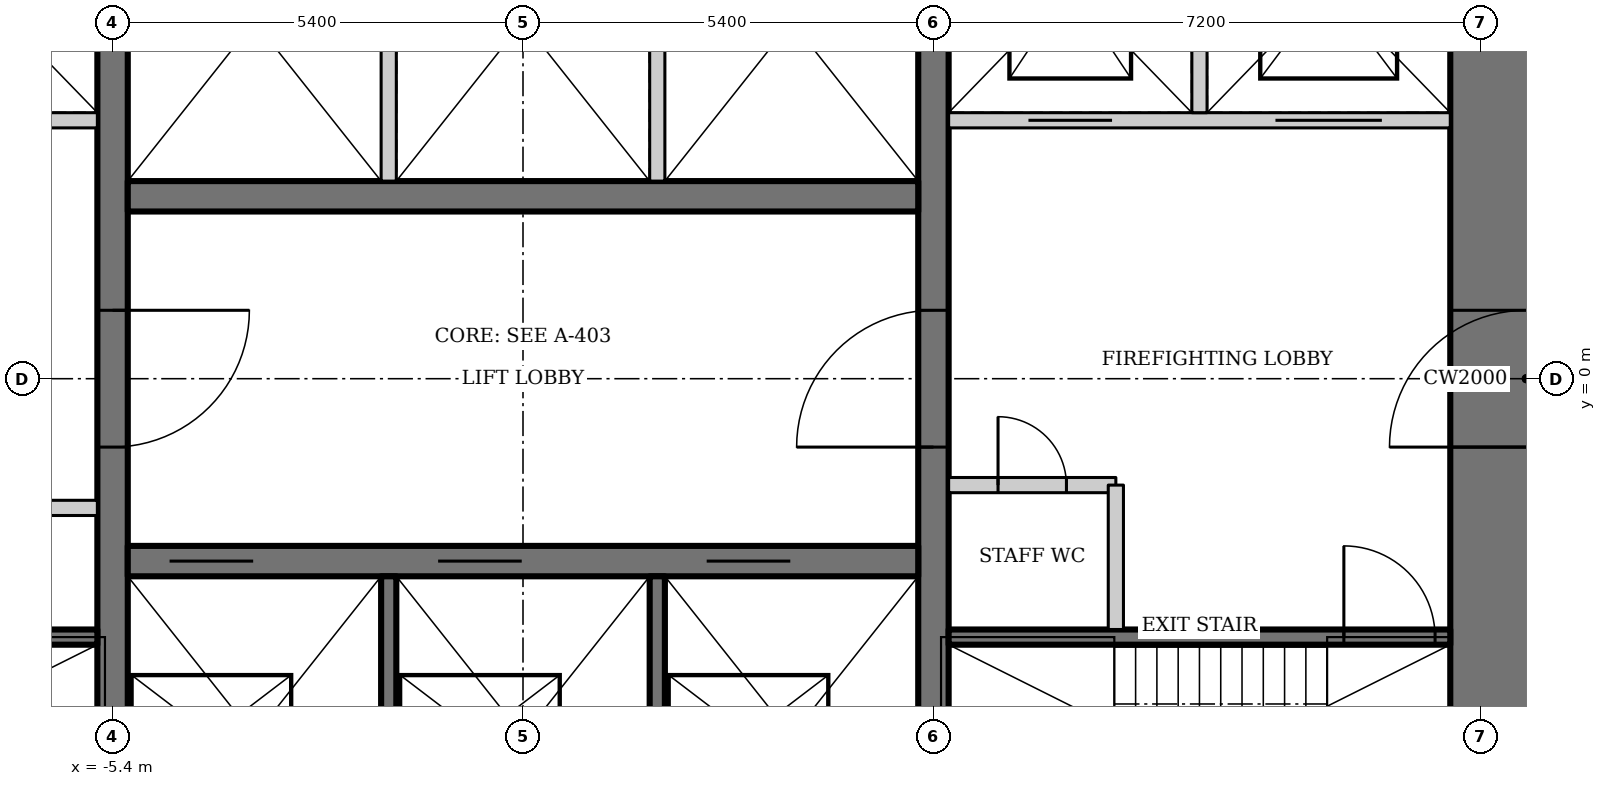
"""IFC4 building model, lengths in metres.
Left out: names, types, materials, properties, quantities, classifications, styles, units other than length and angle.
Written with IfcOpenShell. Run it as: python <this file> out.ifc"""

import sys

from ifc_helpers import new_model, si_unit, direction, frame, frame_2d, origin, place, context, subcontext, project, spatial, rectangle, extrude, element, fill, save


model = new_model("IFC4")
c1 = context("Model", 3, precision=1e-05, world=origin(), true_north=direction((0.0, 1.0)))
c2 = subcontext(c1, "Body", "Model", "MODEL_VIEW")
j1 = project(units=[si_unit("LENGTHUNIT", "METRE"), si_unit("PLANEANGLEUNIT", "RADIAN")], contexts=[c1])
p1 = place(None, origin())
s1 = spatial("IfcSite", under=j1, at=p1, CompositionType="ELEMENT")
p2 = place(p1, origin())
s2 = spatial("IfcBuilding", under=s1, at=p2, CompositionType="ELEMENT")
p3 = place(p2, frame((0.0, 0.0, 98.2)))
s3 = spatial("IfcBuildingStorey", under=s2, at=p3, CompositionType="ELEMENT", Elevation=98.2)
p4 = place(p3, frame((13.2, -13.0, 0.0), z_axis=(0.0, 0.0, 1.0), x_axis=(0.0, 1.0, 0.0)))
e1 = element("IfcWall", 1, at=p4, inside=s3, PredefinedType="SHEAR", context=c2, shape_type="SweptSolid", body=[
    extrude(rectangle(XDim=26.0, YDim=2.0, at=frame_2d((13.0, 0.0))), origin(), (0.0, 0.0, 1.0), 3.6),
])
p5 = place(p4, frame((12.1, 0.0, 0.0)))
e2 = element("IfcOpeningElement", 2, at=p5, cuts=e1, PredefinedType="OPENING", context=c2, shape_type="SweptSolid", body=[
    extrude(rectangle(XDim=1.8, YDim=2.1, at=frame_2d((0.9, 1.05))), frame((0.0, 1.01, 0.0), z_axis=(0.0, -1.0, 0.0), x_axis=(1.0, 0.0, 0.0)), (0.0, 0.0, 1.0), 2.02),
])
p6 = place(p3, frame((5.4, -6.8, 0.0), z_axis=(0.0, 0.0, 1.0), x_axis=(0.0, 1.0, 0.0)))
e3 = element("IfcWall", 3, at=p6, inside=s3, PredefinedType="SHEAR", context=c2, shape_type="SweptSolid", body=[
    extrude(rectangle(XDim=13.6, YDim=0.4, at=frame_2d((6.8, 0.0))), origin(), (0.0, 0.0, 1.0), 3.6),
])
p7 = place(p6, frame((5.9, 0.0, 0.0)))
e4 = element("IfcOpeningElement", 4, at=p7, cuts=e3, PredefinedType="OPENING", context=c2, shape_type="SweptSolid", body=[
    extrude(rectangle(XDim=1.8, YDim=2.1, at=frame_2d((0.9, 1.05))), frame((0.0, 0.21, 0.0), z_axis=(0.0, -1.0, 0.0), x_axis=(1.0, 0.0, 0.0)), (0.0, 0.0, 1.0), 0.42),
])
p8 = place(p3, frame((-5.4, 6.8, 0.0), z_axis=(0.0, 0.0, 1.0), x_axis=(0.0, -1.0, 0.0)))
e5 = element("IfcWall", 5, at=p8, inside=s3, PredefinedType="SHEAR", context=c2, shape_type="SweptSolid", body=[
    extrude(rectangle(XDim=13.6, YDim=0.4, at=frame_2d((6.8, 0.0))), origin(), (0.0, 0.0, 1.0), 3.6),
])
p9 = place(p8, frame((5.9, 0.0, 0.0)))
e6 = element("IfcOpeningElement", 6, at=p9, cuts=e5, PredefinedType="OPENING", context=c2, shape_type="SweptSolid", body=[
    extrude(rectangle(XDim=1.8, YDim=2.1, at=frame_2d((0.9, 1.05))), frame((0.0, 0.21, 0.0), z_axis=(0.0, -1.0, 0.0), x_axis=(1.0, 0.0, 0.0)), (0.0, 0.0, 1.0), 0.42),
])
p10 = place(p3, frame((-5.2, -2.4, 0.0), z_axis=(0.0, 0.0, 1.0), x_axis=(1.0, 0.0, 0.0)))
e7 = element("IfcWall", 7, at=p10, inside=s3, PredefinedType="SHEAR", context=c2, shape_type="SweptSolid", body=[
    extrude(rectangle(XDim=10.4, YDim=0.4, at=frame_2d((5.2, 0.0))), origin(), (0.0, 0.0, 1.0), 3.6),
])
p11 = place(p10, frame((0.55, 0.0, 0.0)))
e8 = element("IfcOpeningElement", 8, at=p11, cuts=e7, PredefinedType="OPENING", context=c2, shape_type="SweptSolid", body=[
    extrude(rectangle(XDim=1.1, YDim=2.2, at=frame_2d((0.55, 1.1))), frame((0.0, 0.21, 0.0), z_axis=(0.0, -1.0, 0.0), x_axis=(1.0, 0.0, 0.0)), (0.0, 0.0, 1.0), 0.42),
])
p12 = place(p10, frame((4.083, 0.0, 0.0)))
e9 = element("IfcOpeningElement", 9, at=p12, cuts=e7, PredefinedType="OPENING", context=c2, shape_type="SweptSolid", body=[
    extrude(rectangle(XDim=1.1, YDim=2.2, at=frame_2d((0.55, 1.1))), frame((0.0, 0.21, 0.0), z_axis=(0.0, -1.0, 0.0), x_axis=(1.0, 0.0, 0.0)), (0.0, 0.0, 1.0), 0.42),
])
p13 = place(p10, frame((7.617, 0.0, 0.0)))
e10 = element("IfcOpeningElement", 10, at=p13, cuts=e7, PredefinedType="OPENING", context=c2, shape_type="SweptSolid", body=[
    extrude(rectangle(XDim=1.1, YDim=2.2, at=frame_2d((0.55, 1.1))), frame((0.0, 0.21, 0.0), z_axis=(0.0, -1.0, 0.0), x_axis=(1.0, 0.0, 0.0)), (0.0, 0.0, 1.0), 0.42),
])
for number, where, z_axis, x_axis in (
    (11, (-1.767, -2.6, 0.0), (0.0, 0.0, 1.0), (0.0, -1.0, 0.0)),
    (12, (1.767, -2.6, 0.0), (0.0, 0.0, 1.0), (0.0, -1.0, 0.0)),
):
    element("IfcWall", number, at=place(p3, frame(where, z_axis=z_axis, x_axis=x_axis)), inside=s3, PredefinedType="SOLIDWALL", context=c2, shape_type="SweptSolid", body=[
        extrude(rectangle(XDim=4.2, YDim=0.2, at=frame_2d((2.1, 0.0))), origin(), (0.0, 0.0, 1.0), 3.6),
    ])
p14 = place(p3, frame((5.2, 2.4, 0.0), z_axis=(0.0, 0.0, 1.0), x_axis=(-1.0, 0.0, 0.0)))
e13 = element("IfcWall", 13, at=p14, inside=s3, PredefinedType="SHEAR", context=c2, shape_type="SweptSolid", body=[
    extrude(rectangle(XDim=10.4, YDim=0.4, at=frame_2d((5.2, 0.0))), origin(), (0.0, 0.0, 1.0), 3.6),
])
for number, where, z_axis, x_axis in (
    (14, (-1.767, 2.6, 0.0), (0.0, 0.0, 1.0), (0.0, 1.0, 0.0)),
    (15, (1.767, 2.6, 0.0), (0.0, 0.0, 1.0), (0.0, 1.0, 0.0)),
):
    element("IfcWall", number, at=place(p3, frame(where, z_axis=z_axis, x_axis=x_axis)), inside=s3, PredefinedType="SOLIDWALL", context=c2, shape_type="SweptSolid", body=[
        extrude(rectangle(XDim=4.2, YDim=0.2, at=frame_2d((2.1, 0.0))), origin(), (0.0, 0.0, 1.0), 3.6),
    ])
p15 = place(p3, frame((5.6, -3.4, 0.0), z_axis=(0.0, 0.0, 1.0), x_axis=(1.0, 0.0, 0.0)))
e16 = element("IfcWall", 16, at=p15, inside=s3, PredefinedType="SHEAR", context=c2, shape_type="SweptSolid", body=[
    extrude(rectangle(XDim=6.6, YDim=0.2, at=frame_2d((3.3, 0.0))), origin(), (0.0, 0.0, 1.0), 3.6),
])
p16 = place(p15, frame((5.2, 0.0, 0.0)))
e17 = element("IfcOpeningElement", 17, at=p16, cuts=e16, PredefinedType="OPENING", context=c2, shape_type="SweptSolid", body=[
    extrude(rectangle(XDim=1.2, YDim=2.1, at=frame_2d((0.6, 1.05))), frame((0.0, 0.11, 0.0), z_axis=(0.0, -1.0, 0.0), x_axis=(1.0, 0.0, 0.0)), (0.0, 0.0, 1.0), 0.22),
])
p17 = place(p3, frame((12.2, 3.4, 0.0), z_axis=(0.0, 0.0, 1.0), x_axis=(-1.0, 0.0, 0.0)))
e18 = element("IfcWall", 18, at=p17, inside=s3, PredefinedType="SOLIDWALL", context=c2, shape_type="SweptSolid", body=[
    extrude(rectangle(XDim=6.6, YDim=0.2, at=frame_2d((3.3, 0.0))), origin(), (0.0, 0.0, 1.0), 3.6),
])
p18 = place(p17, frame((4.45, 0.0, 0.0)))
e19 = element("IfcOpeningElement", 19, at=p18, cuts=e18, PredefinedType="OPENING", context=c2, shape_type="SweptSolid", body=[
    extrude(rectangle(XDim=1.1, YDim=2.2, at=frame_2d((0.55, 1.1))), frame((0.0, 0.11, 0.0), z_axis=(0.0, -1.0, 0.0), x_axis=(1.0, 0.0, 0.0)), (0.0, 0.0, 1.0), 0.22),
])
p19 = place(p17, frame((0.9, 0.0, 0.0)))
e20 = element("IfcOpeningElement", 20, at=p19, cuts=e18, PredefinedType="OPENING", context=c2, shape_type="SweptSolid", body=[
    extrude(rectangle(XDim=1.4, YDim=2.2, at=frame_2d((0.7, 1.1))), frame((0.0, 0.11, 0.0), z_axis=(0.0, -1.0, 0.0), x_axis=(1.0, 0.0, 0.0)), (0.0, 0.0, 1.0), 0.22),
])
p20 = place(p3, frame((8.9, 3.5, 0.0), z_axis=(0.0, 0.0, 1.0), x_axis=(0.0, 1.0, 0.0)))
e21 = element("IfcWall", 21, at=p20, inside=s3, PredefinedType="SOLIDWALL", context=c2, shape_type="SweptSolid", body=[
    extrude(rectangle(XDim=3.3, YDim=0.2, at=frame_2d((1.65, 0.0))), origin(), (0.0, 0.0, 1.0), 3.6),
])
p21 = place(p3, frame((-5.6, -3.4, 0.0), z_axis=(0.0, 0.0, 1.0), x_axis=(-1.0, 0.0, 0.0)))
e22 = element("IfcWall", 22, at=p21, inside=s3, PredefinedType="SHEAR", context=c2, shape_type="SweptSolid", body=[
    extrude(rectangle(XDim=6.6, YDim=0.2, at=frame_2d((3.3, 0.0))), origin(), (0.0, 0.0, 1.0), 3.6),
])
p22 = place(p21, frame((5.2, 0.0, 0.0)))
e23 = element("IfcOpeningElement", 23, at=p22, cuts=e22, PredefinedType="OPENING", context=c2, shape_type="SweptSolid", body=[
    extrude(rectangle(XDim=1.2, YDim=2.1, at=frame_2d((0.6, 1.05))), frame((0.0, 0.11, 0.0), z_axis=(0.0, -1.0, 0.0), x_axis=(1.0, 0.0, 0.0)), (0.0, 0.0, 1.0), 0.22),
])
p23 = place(p3, frame((-12.2, 3.4, 0.0), z_axis=(0.0, 0.0, 1.0), x_axis=(1.0, 0.0, 0.0)))
e24 = element("IfcWall", 24, at=p23, inside=s3, PredefinedType="SOLIDWALL", context=c2, shape_type="SweptSolid", body=[
    extrude(rectangle(XDim=6.6, YDim=0.2, at=frame_2d((3.3, 0.0))), origin(), (0.0, 0.0, 1.0), 3.6),
])
p24 = place(p23, frame((1.05, 0.0, 0.0)))
e25 = element("IfcOpeningElement", 25, at=p24, cuts=e24, PredefinedType="OPENING", context=c2, shape_type="SweptSolid", body=[
    extrude(rectangle(XDim=1.1, YDim=2.2, at=frame_2d((0.55, 1.1))), frame((0.0, 0.11, 0.0), z_axis=(0.0, -1.0, 0.0), x_axis=(1.0, 0.0, 0.0)), (0.0, 0.0, 1.0), 0.22),
])
p25 = place(p23, frame((4.3, 0.0, 0.0)))
e26 = element("IfcOpeningElement", 26, at=p25, cuts=e24, PredefinedType="OPENING", context=c2, shape_type="SweptSolid", body=[
    extrude(rectangle(XDim=1.4, YDim=2.2, at=frame_2d((0.7, 1.1))), frame((0.0, 0.11, 0.0), z_axis=(0.0, -1.0, 0.0), x_axis=(1.0, 0.0, 0.0)), (0.0, 0.0, 1.0), 0.22),
])
p26 = place(p3, frame((-5.6, -1.7, 0.0), z_axis=(0.0, 0.0, 1.0), x_axis=(-1.0, 0.0, 0.0)))
e27 = element("IfcWall", 27, at=p26, inside=s3, PredefinedType="SOLIDWALL", context=c2, shape_type="SweptSolid", body=[
    extrude(rectangle(XDim=3.2, YDim=0.2, at=frame_2d((1.6, 0.0))), origin(), (0.0, 0.0, 1.0), 3.45),
])
p27 = place(p26, frame((1.15, 0.0, 0.0)))
e28 = element("IfcOpeningElement", 28, at=p27, cuts=e27, PredefinedType="OPENING", context=c2, shape_type="SweptSolid", body=[
    extrude(rectangle(XDim=0.9, YDim=2.1, at=frame_2d((0.45, 1.05))), frame((0.0, 0.11, 0.0), z_axis=(0.0, -1.0, 0.0), x_axis=(1.0, 0.0, 0.0)), (0.0, 0.0, 1.0), 0.22),
])
p28 = place(p3, frame((5.6, -1.4, 0.0), z_axis=(0.0, 0.0, 1.0), x_axis=(1.0, 0.0, 0.0)))
e29 = element("IfcWall", 29, at=p28, inside=s3, PredefinedType="SOLIDWALL", context=c2, shape_type="SweptSolid", body=[
    extrude(rectangle(XDim=2.2, YDim=0.2, at=frame_2d((1.1, 0.0))), origin(), (0.0, 0.0, 1.0), 3.45),
])
p29 = place(p28, frame((0.65, 0.0, 0.0)))
e30 = element("IfcOpeningElement", 30, at=p29, cuts=e29, PredefinedType="OPENING", context=c2, shape_type="SweptSolid", body=[
    extrude(rectangle(XDim=0.9, YDim=2.1, at=frame_2d((0.45, 1.05))), frame((0.0, 0.11, 0.0), z_axis=(0.0, -1.0, 0.0), x_axis=(1.0, 0.0, 0.0)), (0.0, 0.0, 1.0), 0.22),
])
p30 = place(p3, frame((7.8, -1.4, 0.0), z_axis=(0.0, 0.0, 1.0), x_axis=(0.0, -1.0, 0.0)))
e31 = element("IfcWall", 31, at=p30, inside=s3, PredefinedType="SOLIDWALL", context=c2, shape_type="SweptSolid", body=[
    extrude(rectangle(XDim=1.9, YDim=0.2, at=frame_2d((0.95, 0.0))), origin(), (0.0, 0.0, 1.0), 3.45),
])
p31 = place(p29, origin())
e32 = element("IfcDoor", 32, at=p31, inside=s3, OperationType="SINGLE_SWING_LEFT", PredefinedType="DOOR", context=c2, shape_type="SweptSolid", body=[
    extrude(rectangle(XDim=0.9, YDim=2.1, at=frame_2d((0.45, 1.05))), frame((0.0, 0.025, 0.0), z_axis=(0.0, -1.0, 0.0), x_axis=(1.0, 0.0, 0.0)), (0.0, 0.0, 1.0), 0.05),
])
fill(e30, e32)
p32 = place(p7, origin())
e33 = element("IfcDoor", 33, at=p32, inside=s3, OperationType="DOUBLE_DOOR_DOUBLE_SWING", PredefinedType="DOOR", context=c2, shape_type="SweptSolid", body=[
    extrude(rectangle(XDim=1.8, YDim=2.1, at=frame_2d((0.9, 1.05))), frame((0.0, 0.025, 0.0), z_axis=(0.0, -1.0, 0.0), x_axis=(1.0, 0.0, 0.0)), (0.0, 0.0, 1.0), 0.05),
])
fill(e4, e33)
p33 = place(p9, origin())
e34 = element("IfcDoor", 34, at=p33, inside=s3, OperationType="DOUBLE_DOOR_DOUBLE_SWING", PredefinedType="DOOR", context=c2, shape_type="SweptSolid", body=[
    extrude(rectangle(XDim=1.8, YDim=2.1, at=frame_2d((0.9, 1.05))), frame((0.0, 0.025, 0.0), z_axis=(0.0, -1.0, 0.0), x_axis=(1.0, 0.0, 0.0)), (0.0, 0.0, 1.0), 0.05),
])
fill(e6, e34)
p34 = place(p16, origin())
e35 = element("IfcDoor", 35, at=p34, inside=s3, OperationType="SINGLE_SWING_RIGHT", PredefinedType="DOOR", context=c2, shape_type="SweptSolid", body=[
    extrude(rectangle(XDim=1.2, YDim=2.1, at=frame_2d((0.6, 1.05))), frame((0.0, 0.025, 0.0), z_axis=(0.0, -1.0, 0.0), x_axis=(1.0, 0.0, 0.0)), (0.0, 0.0, 1.0), 0.05),
])
fill(e17, e35)
p35 = place(p5, origin())
e36 = element("IfcDoor", 36, at=p35, inside=s3, OperationType="DOUBLE_DOOR_DOUBLE_SWING", PredefinedType="DOOR", context=c2, shape_type="SweptSolid", body=[
    extrude(rectangle(XDim=1.8, YDim=2.1, at=frame_2d((0.9, 1.05))), frame((0.0, 0.025, 0.0), z_axis=(0.0, -1.0, 0.0), x_axis=(1.0, 0.0, 0.0)), (0.0, 0.0, 1.0), 0.05),
])
fill(e2, e36)
p36 = place(p11, origin())
e37 = element("IfcDoor", 37, at=p36, inside=s3, OperationType="DOUBLE_DOOR_SLIDING", PredefinedType="DOOR", context=c2, shape_type="SweptSolid", body=[
    extrude(rectangle(XDim=1.1, YDim=2.2, at=frame_2d((0.55, 1.1))), frame((0.0, 0.025, 0.0), z_axis=(0.0, -1.0, 0.0), x_axis=(1.0, 0.0, 0.0)), (0.0, 0.0, 1.0), 0.05),
])
fill(e8, e37)
p37 = place(p12, origin())
e38 = element("IfcDoor", 38, at=p37, inside=s3, OperationType="DOUBLE_DOOR_SLIDING", PredefinedType="DOOR", context=c2, shape_type="SweptSolid", body=[
    extrude(rectangle(XDim=1.1, YDim=2.2, at=frame_2d((0.55, 1.1))), frame((0.0, 0.025, 0.0), z_axis=(0.0, -1.0, 0.0), x_axis=(1.0, 0.0, 0.0)), (0.0, 0.0, 1.0), 0.05),
])
fill(e9, e38)
p38 = place(p13, origin())
e39 = element("IfcDoor", 39, at=p38, inside=s3, OperationType="DOUBLE_DOOR_SLIDING", PredefinedType="DOOR", context=c2, shape_type="SweptSolid", body=[
    extrude(rectangle(XDim=1.1, YDim=2.2, at=frame_2d((0.55, 1.1))), frame((0.0, 0.025, 0.0), z_axis=(0.0, -1.0, 0.0), x_axis=(1.0, 0.0, 0.0)), (0.0, 0.0, 1.0), 0.05),
])
fill(e10, e39)
p39 = place(p18, origin())
e40 = element("IfcDoor", 40, at=p39, inside=s3, OperationType="DOUBLE_DOOR_SLIDING", PredefinedType="DOOR", context=c2, shape_type="SweptSolid", body=[
    extrude(rectangle(XDim=1.1, YDim=2.2, at=frame_2d((0.55, 1.1))), frame((0.0, 0.025, 0.0), z_axis=(0.0, -1.0, 0.0), x_axis=(1.0, 0.0, 0.0)), (0.0, 0.0, 1.0), 0.05),
])
fill(e19, e40)
p40 = place(p19, origin())
e41 = element("IfcDoor", 41, at=p40, inside=s3, OperationType="DOUBLE_DOOR_SLIDING", PredefinedType="DOOR", context=c2, shape_type="SweptSolid", body=[
    extrude(rectangle(XDim=1.4, YDim=2.2, at=frame_2d((0.7, 1.1))), frame((0.0, 0.025, 0.0), z_axis=(0.0, -1.0, 0.0), x_axis=(1.0, 0.0, 0.0)), (0.0, 0.0, 1.0), 0.05),
])
fill(e20, e41)
save(model, sys.argv[1])
